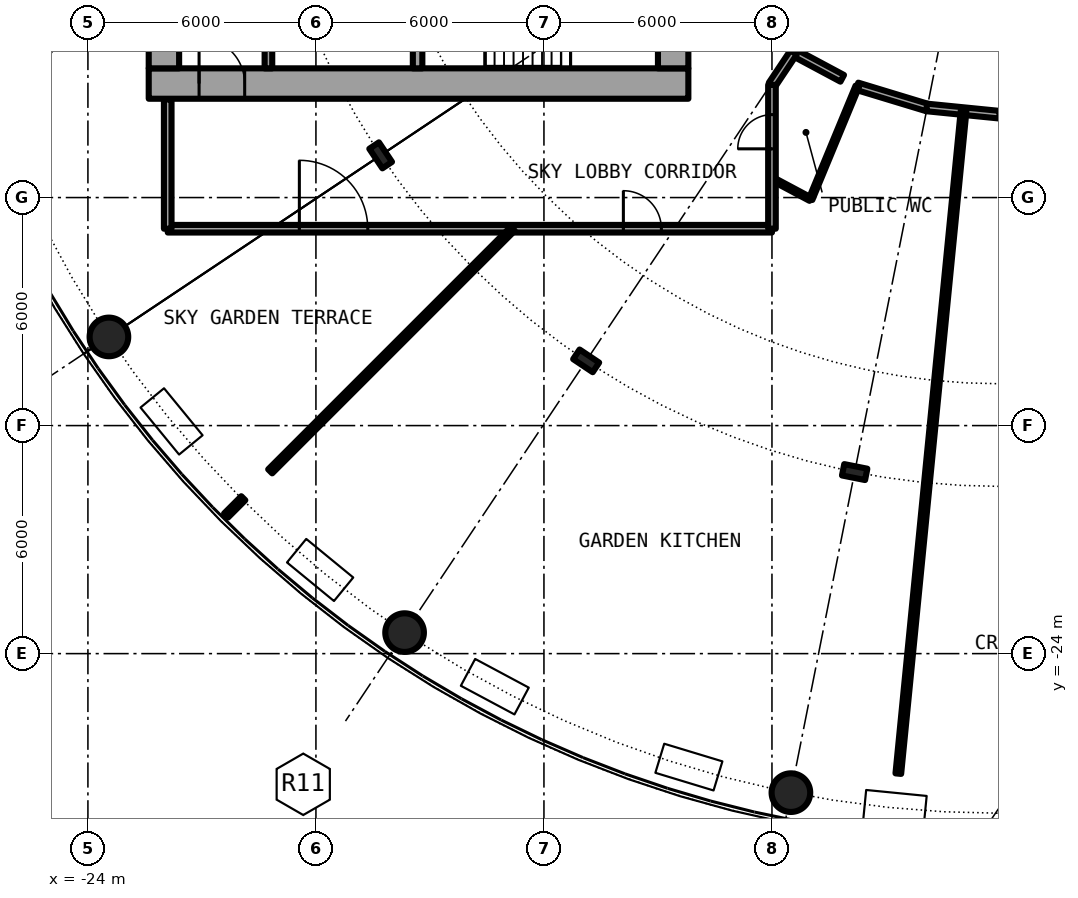
"""IFC4 building model, lengths in metres.
Left out: names, types, materials, properties, quantities, classifications, styles, units other than length and angle.
Written with IfcOpenShell. Run it as: python <this file> out.ifc"""

import sys

from ifc_helpers import new_model, si_unit, direction, frame, frame_2d, origin, origin_2d, place, context, subcontext, project, spatial, rectangle, hollow_circle, i_section, extrude, element, fill, save


model = new_model("IFC4")
c1 = context("Model", 3, precision=1e-05, world=origin(), true_north=direction((0.0, 1.0)))
c2 = subcontext(c1, "Body", "Model", "MODEL_VIEW")
j1 = project(units=[si_unit("LENGTHUNIT", "METRE"), si_unit("PLANEANGLEUNIT", "RADIAN")], contexts=[c1])
p1 = place(None, origin())
s1 = spatial("IfcSite", under=j1, at=p1, CompositionType="ELEMENT")
p2 = place(p1, origin())
s2 = spatial("IfcBuilding", under=s1, at=p2, CompositionType="ELEMENT")
p3 = place(p2, frame((0.0, 0.0, 57.5)))
s3 = spatial("IfcBuildingStorey", under=s2, at=p3, CompositionType="ELEMENT", Elevation=57.5)
for number, where, z_axis, x_axis in (
    (1, (-23.448, -15.667, 0.0), (0.0, 0.0, 1.0), (1.0, 0.0, 0.0)),
    (2, (-15.667, -23.448, 0.0), (0.0, 0.0, 1.0), (1.0, 0.0, 0.0)),
    (3, (-5.501, -27.658, 0.0), (0.0, 0.0, 1.0), (1.0, 0.0, 0.0)),
):
    element("IfcColumn", number, at=place(p3, frame(where, z_axis=z_axis, x_axis=x_axis)), inside=s3, PredefinedType="COLUMN", context=c2, shape_type="SweptSolid", body=[
        extrude(hollow_circle(Radius=0.508, WallThickness=0.05, at=origin_2d()), origin(), (0.0, 0.0, 1.0), 6.1),
    ])
for number, where, z_axis, x_axis in (
    (4, (-16.297, -10.889, 0.0), (0.0, 0.0, 1.0), (-0.831, -0.556, 0.0)),
    (5, (-10.889, -16.297, 0.0), (0.0, 0.0, 1.0), (-0.556, -0.831, 0.0)),
    (6, (-3.824, -19.223, 0.0), (0.0, 0.0, 1.0), (-0.195, -0.981, 0.0)),
):
    element("IfcColumn", number, at=place(p3, frame(where, z_axis=z_axis, x_axis=x_axis)), inside=s3, PredefinedType="COLUMN", context=c2, shape_type="SweptSolid", body=[
        extrude(i_section(OverallWidth=0.305, OverallDepth=0.62, WebThickness=0.021, FlangeThickness=0.04, FilletRadius=0.027, at=origin_2d()), origin(), (0.0, 0.0, 1.0), 6.1),
    ])
p4 = place(p3, frame((-22.4, -9.0, 0.0), z_axis=(0.0, 0.0, 1.0), x_axis=(1.0, 0.0, 0.0)))
e7 = element("IfcWall", 7, at=p4, inside=s3, PredefinedType="SHEAR", context=c2, shape_type="SweptSolid", body=[
    extrude(rectangle(XDim=14.2, YDim=0.8, at=frame_2d((7.1, 0.0))), origin(), (0.0, 0.0, 1.0), 6.1),
])
p5 = place(p4, frame((1.325, 0.0, 0.0)))
e8 = element("IfcOpeningElement", 8, at=p5, cuts=e7, PredefinedType="OPENING", context=c2, shape_type="SweptSolid", body=[
    extrude(rectangle(XDim=1.2, YDim=2.3, at=frame_2d((0.6, 1.15))), frame((0.0, 0.41, 0.0), z_axis=(0.0, -1.0, 0.0), x_axis=(1.0, 0.0, 0.0)), (0.0, 0.0, 1.0), 0.82),
])
p6 = place(p3, frame((-22.0, -8.6, 0.0), z_axis=(0.0, 0.0, 1.0), x_axis=(0.0, 1.0, 0.0)))
e9 = element("IfcWall", 9, at=p6, inside=s3, PredefinedType="SHEAR", context=c2, shape_type="SweptSolid", body=[
    extrude(rectangle(XDim=17.2, YDim=0.8, at=frame_2d((8.6, 0.0))), origin(), (0.0, 0.0, 1.0), 6.1),
])
p7 = place(p6, frame((7.4, 0.0, 0.0)))
e10 = element("IfcOpeningElement", 10, at=p7, cuts=e9, PredefinedType="OPENING", context=c2, shape_type="SweptSolid", body=[
    extrude(rectangle(XDim=2.4, YDim=2.3, at=frame_2d((1.2, 1.15))), frame((0.0, 0.41, 0.0), z_axis=(0.0, -1.0, 0.0), x_axis=(1.0, 0.0, 0.0)), (0.0, 0.0, 1.0), 0.82),
])
p8 = place(p3, frame((-8.6, 8.6, 0.0), z_axis=(0.0, 0.0, 1.0), x_axis=(0.0, -1.0, 0.0)))
e11 = element("IfcWall", 11, at=p8, inside=s3, PredefinedType="SHEAR", context=c2, shape_type="SweptSolid", body=[
    extrude(rectangle(XDim=17.2, YDim=0.8, at=frame_2d((8.6, 0.0))), origin(), (0.0, 0.0, 1.0), 6.1),
])
p9 = place(p8, frame((7.4, 0.0, 0.1)))
e12 = element("IfcOpeningElement", 12, at=p9, cuts=e11, PredefinedType="OPENING", context=c2, shape_type="SweptSolid", body=[
    extrude(rectangle(XDim=2.4, YDim=2.2, at=frame_2d((1.2, 1.1))), frame((0.0, 0.41, 0.0), z_axis=(0.0, -1.0, 0.0), x_axis=(1.0, 0.0, 0.0)), (0.0, 0.0, 1.0), 0.82),
])
p10 = place(p3, frame((-15.325, -4.65, 0.0), z_axis=(0.0, 0.0, 1.0), x_axis=(0.0, -1.0, 0.0)))
e13 = element("IfcWall", 13, at=p10, inside=s3, PredefinedType="SHEAR", context=c2, shape_type="SweptSolid", body=[
    extrude(rectangle(XDim=3.95, YDim=0.25, at=frame_2d((1.975, 0.0))), origin(), (0.0, 0.0, 1.0), 6.1),
])
p11 = place(p10, frame((1.375, 0.0, 0.0)))
e14 = element("IfcOpeningElement", 14, at=p11, cuts=e13, PredefinedType="OPENING", context=c2, shape_type="SweptSolid", body=[
    extrude(rectangle(XDim=1.2, YDim=2.3, at=frame_2d((0.6, 1.15))), frame((0.0, 0.135, 0.0), z_axis=(0.0, -1.0, 0.0), x_axis=(1.0, 0.0, 0.0)), (0.0, 0.0, 1.0), 0.27),
])
p12 = place(p3, frame((-19.25, -1.575, 0.0), z_axis=(0.0, 0.0, 1.0), x_axis=(0.0, -1.0, 0.0)))
e15 = element("IfcWall", 15, at=p12, inside=s3, PredefinedType="SOLIDWALL", context=c2, shape_type="SweptSolid", body=[
    extrude(rectangle(XDim=7.025, YDim=0.2, at=frame_2d((3.513, 0.0))), origin(), (0.0, 0.0, 1.0), 5.75),
])
p13 = place(p12, frame((4.475, 0.0, 0.0)))
e16 = element("IfcOpeningElement", 16, at=p13, cuts=e15, PredefinedType="OPENING", context=c2, shape_type="SweptSolid", body=[
    extrude(rectangle(XDim=1.1, YDim=2.3, at=frame_2d((0.55, 1.15))), frame((0.0, 0.11, 0.0), z_axis=(0.0, -1.0, 0.0), x_axis=(1.0, 0.0, 0.0)), (0.0, 0.0, 1.0), 0.22),
])
p14 = place(p3, frame((-6.0, -11.503, 0.0), z_axis=(0.0, 0.0, 1.0), x_axis=(0.882235076446, -0.470809165042, 0.0)))
e17 = element("IfcWall", 17, at=p14, inside=s3, PredefinedType="PARTITIONING", context=c2, shape_type="SweptSolid", body=[
    extrude(rectangle(XDim=1.147, YDim=0.1, at=frame_2d((0.573, 0.0))), origin(), (0.0, 0.0, 1.0), 5.75),
])
p15 = place(p3, frame((-21.9, -12.82, 0.0), z_axis=(0.0, 0.0, 1.0), x_axis=(1.0, 0.0, 0.0)))
e18 = element("IfcWall", 18, at=p15, inside=s3, PredefinedType="PARTITIONING", context=c2, shape_type="SweptSolid", body=[
    extrude(rectangle(XDim=15.9, YDim=0.2, at=frame_2d((7.95, 0.0))), origin(), (0.0, 0.0, 1.0), 5.75),
])
p16 = place(p15, frame((11.99, 0.0, 0.0)))
e19 = element("IfcOpeningElement", 19, at=p16, cuts=e18, PredefinedType="OPENING", context=c2, shape_type="SweptSolid", body=[
    extrude(rectangle(XDim=1.0, YDim=2.3, at=frame_2d((0.5, 1.15))), frame((0.0, 0.11, 0.0), z_axis=(0.0, -1.0, 0.0), x_axis=(1.0, 0.0, 0.0)), (0.0, 0.0, 1.0), 0.22),
])
p17 = place(p15, frame((3.464, 0.0, 0.0)))
e20 = element("IfcOpeningElement", 20, at=p17, cuts=e18, PredefinedType="OPENING", context=c2, shape_type="SweptSolid", body=[
    extrude(rectangle(XDim=1.8, YDim=2.3, at=frame_2d((0.9, 1.15))), frame((0.0, 0.11, 0.0), z_axis=(0.0, -1.0, 0.0), x_axis=(1.0, 0.0, 0.0)), (0.0, 0.0, 1.0), 0.22),
])
p18 = place(p3, frame((-5.429, -8.179, 0.0), z_axis=(0.0, 0.0, 1.0), x_axis=(0.881652665802, -0.471898905364, 0.0)))
e21 = element("IfcWall", 21, at=p18, inside=s3, PredefinedType="PARTITIONING", context=c2, shape_type="SweptSolid", body=[
    extrude(rectangle(XDim=1.45, YDim=0.2, at=frame_2d((0.725, 0.0))), origin(), (0.0, 0.0, 1.0), 5.75),
])
p19 = place(p3, frame((-3.758, -9.072, 0.0), z_axis=(0.0, 0.0, 1.0), x_axis=(0.956896312675, -0.29042976223, 0.0)))
e22 = element("IfcWall", 22, at=p19, inside=s3, PredefinedType="PARTITIONING", context=c2, shape_type="SweptSolid", body=[
    extrude(rectangle(XDim=1.925, YDim=0.2, at=frame_2d((0.962, 0.0))), origin(), (0.0, 0.0, 1.0), 5.75),
])
p20 = place(p3, frame((-1.929, -9.629, 0.0), z_axis=(0.0, 0.0, 1.0), x_axis=(0.995059761059, -0.09927775139, 0.0)))
e23 = element("IfcWall", 23, at=p20, inside=s3, PredefinedType="PARTITIONING", context=c2, shape_type="SweptSolid", body=[
    extrude(rectangle(XDim=1.926, YDim=0.2, at=frame_2d((0.963, 0.0))), origin(), (0.0, 0.0, 1.0), 5.75),
])
p21 = place(p3, frame((-6.0, -9.034, 0.0), z_axis=(0.0, 0.0, 1.0), x_axis=(0.555412364489, 0.831575075007, 0.0)))
e24 = element("IfcWall", 24, at=p21, inside=s3, PredefinedType="PARTITIONING", context=c2, shape_type="SweptSolid", body=[
    extrude(rectangle(XDim=1.028, YDim=0.2, at=frame_2d((0.514, 0.0))), origin(), (0.0, 0.0, 1.0), 5.75),
])
p22 = place(p3, frame((-20.365, -20.365, 0.0), z_axis=(0.0, 0.0, 1.0), x_axis=(0.707106781187, 0.707106781187, 0.0)))
e25 = element("IfcWall", 25, at=p22, inside=s3, PredefinedType="PARTITIONING", context=c2, shape_type="SweptSolid", body=[
    extrude(rectangle(XDim=0.642, YDim=0.15, at=frame_2d((0.321, 0.0))), origin(), (0.0, 0.0, 1.0), 5.75),
])
p23 = place(p3, frame((-19.204, -19.204, 0.0), z_axis=(0.0, 0.0, 1.0), x_axis=(0.707106781187, 0.707106781187, 0.0)))
e26 = element("IfcWall", 26, at=p23, inside=s3, PredefinedType="PARTITIONING", context=c2, shape_type="SweptSolid", body=[
    extrude(rectangle(XDim=9.028, YDim=0.15, at=frame_2d((4.514, 0.0))), origin(), (0.0, 0.0, 1.0), 5.75),
])
p24 = place(p3, frame((-4.984, -12.045, 0.0), z_axis=(0.0, 0.0, 1.0), x_axis=(0.382517205945, 0.923948368231, 0.0)))
e27 = element("IfcWall", 27, at=p24, inside=s3, PredefinedType="PARTITIONING", context=c2, shape_type="SweptSolid", body=[
    extrude(rectangle(XDim=3.216, YDim=0.1, at=frame_2d((1.608, 0.0))), origin(), (0.0, 0.0, 1.0), 5.75),
])
p25 = place(p3, frame((-2.675, -27.158, 0.0), z_axis=(0.0, 0.0, 1.0), x_axis=(0.098025634079, 0.995183890074, 0.0)))
e28 = element("IfcWall", 28, at=p25, inside=s3, PredefinedType="PARTITIONING", context=c2, shape_type="SweptSolid", body=[
    extrude(rectangle(XDim=17.516, YDim=0.15, at=frame_2d((8.758, 0.0))), origin(), (0.0, 0.0, 1.0), 5.75),
])
p26 = place(p3, frame((-6.0, -12.82, 0.0), z_axis=(0.0, 0.0, 1.0), x_axis=(0.0, 1.0, 0.0)))
e29 = element("IfcWall", 29, at=p26, inside=s3, PredefinedType="PARTITIONING", context=c2, shape_type="SweptSolid", body=[
    extrude(rectangle(XDim=3.786, YDim=0.2, at=frame_2d((1.893, 0.0))), origin(), (0.0, 0.0, 1.0), 5.75),
])
p27 = place(p26, frame((2.102, 0.0, 0.0)))
e30 = element("IfcOpeningElement", 30, at=p27, cuts=e29, PredefinedType="OPENING", context=c2, shape_type="SweptSolid", body=[
    extrude(rectangle(XDim=0.9, YDim=2.3, at=frame_2d((0.45, 1.15))), frame((0.0, 0.11, 0.0), z_axis=(0.0, -1.0, 0.0), x_axis=(1.0, 0.0, 0.0)), (0.0, 0.0, 1.0), 0.22),
])
p28 = place(p3, frame((-21.9, -12.82, 0.0), z_axis=(0.0, 0.0, 1.0), x_axis=(0.0, 1.0, 0.0)))
e31 = element("IfcWall", 31, at=p28, inside=s3, PredefinedType="PARTITIONING", context=c2, shape_type="SweptSolid", body=[
    extrude(rectangle(XDim=3.4, YDim=0.2, at=frame_2d((1.7, 0.0))), origin(), (0.0, 0.0, 1.0), 5.75),
])
p29 = place(p5, origin())
e32 = element("IfcDoor", 32, at=p29, inside=s3, OperationType="SINGLE_SWING_RIGHT", PredefinedType="DOOR", context=c2, shape_type="SweptSolid", body=[
    extrude(rectangle(XDim=1.2, YDim=2.3, at=frame_2d((0.6, 1.15))), frame((0.0, 0.025, 0.0), z_axis=(0.0, -1.0, 0.0), x_axis=(1.0, 0.0, 0.0)), (0.0, 0.0, 1.0), 0.05),
])
fill(e8, e32)
p30 = place(p27, origin())
e33 = element("IfcDoor", 33, at=p30, inside=s3, OperationType="SINGLE_SWING_RIGHT", PredefinedType="DOOR", context=c2, shape_type="SweptSolid", body=[
    extrude(rectangle(XDim=0.9, YDim=2.3, at=frame_2d((0.45, 1.15))), frame((0.0, 0.025, 0.0), z_axis=(0.0, -1.0, 0.0), x_axis=(1.0, 0.0, 0.0)), (0.0, 0.0, 1.0), 0.05),
])
fill(e30, e33)
p31 = place(p16, origin())
e34 = element("IfcDoor", 34, at=p31, inside=s3, OperationType="SINGLE_SWING_RIGHT", PredefinedType="DOOR", context=c2, shape_type="SweptSolid", body=[
    extrude(rectangle(XDim=1.0, YDim=2.3, at=frame_2d((0.5, 1.15))), frame((0.0, 0.025, 0.0), z_axis=(0.0, -1.0, 0.0), x_axis=(1.0, 0.0, 0.0)), (0.0, 0.0, 1.0), 0.05),
])
fill(e19, e34)
p32 = place(p17, origin())
e35 = element("IfcDoor", 35, at=p32, inside=s3, OperationType="DOUBLE_DOOR_SINGLE_SWING", PredefinedType="DOOR", context=c2, shape_type="SweptSolid", body=[
    extrude(rectangle(XDim=1.8, YDim=2.3, at=frame_2d((0.9, 1.15))), frame((0.0, 0.025, 0.0), z_axis=(0.0, -1.0, 0.0), x_axis=(1.0, 0.0, 0.0)), (0.0, 0.0, 1.0), 0.05),
])
fill(e20, e35)
save(model, sys.argv[1])
